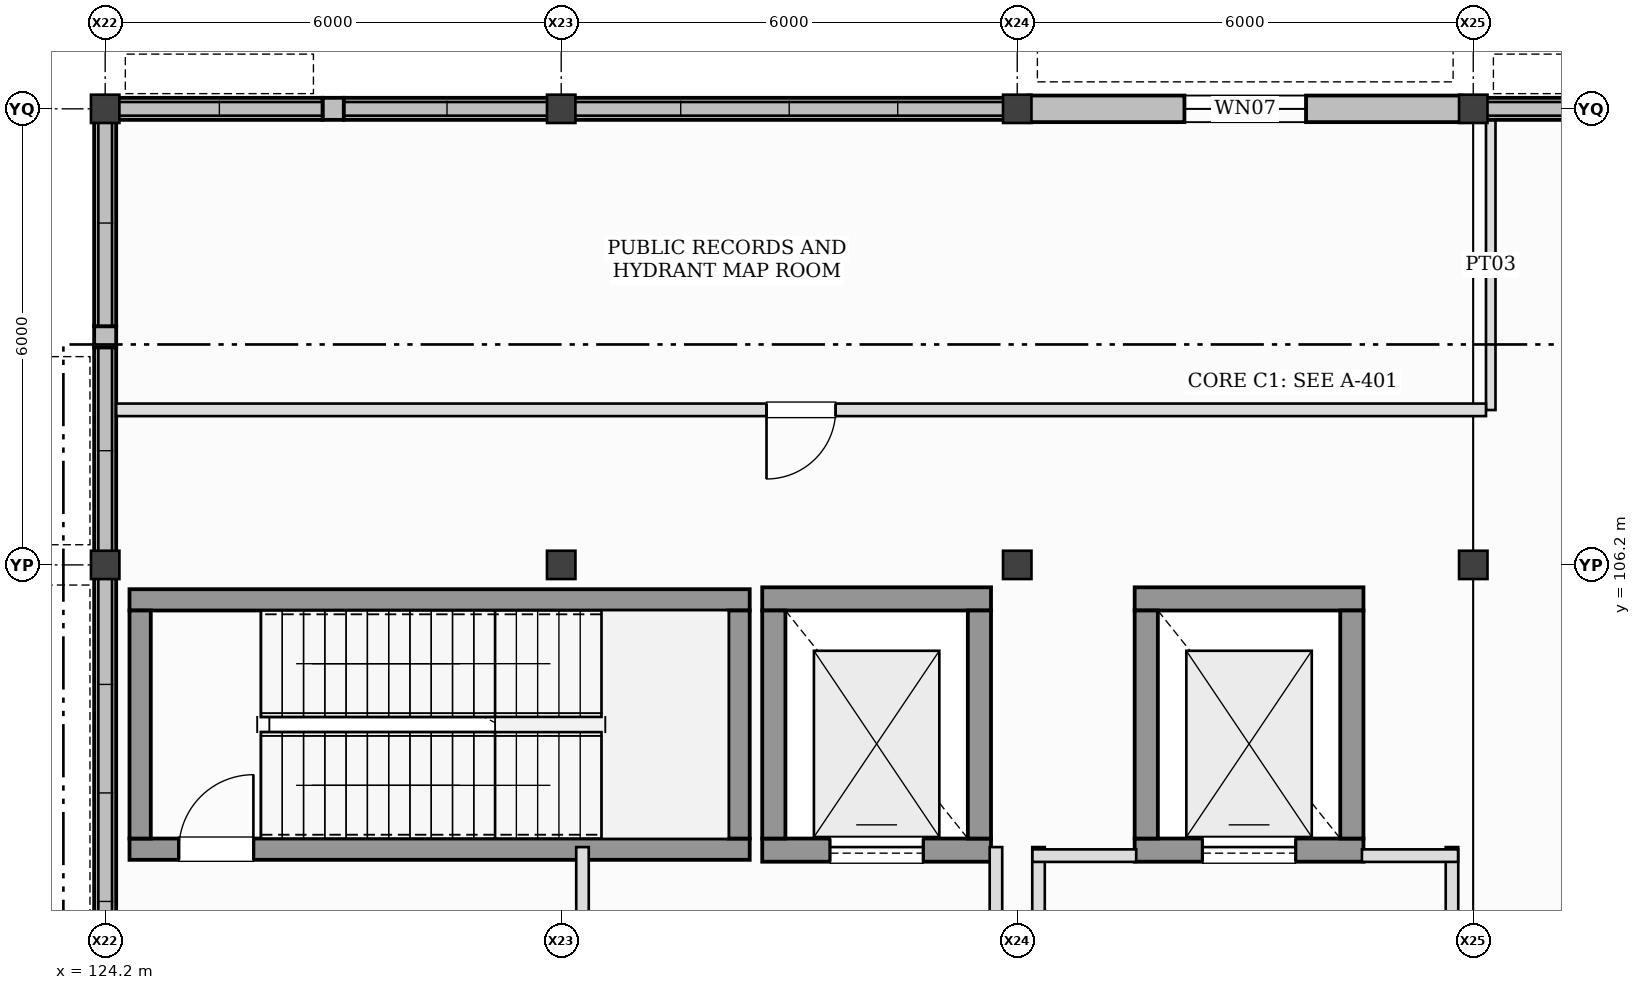
"""IFC4 building model, lengths in metres.
Left out: names, types, materials, properties, quantities, classifications, styles, units other than length and angle.
Written with IfcOpenShell. Run it as: python <this file> out.ifc"""

import sys

from ifc_helpers import new_model, si_unit, direction, frame, frame_2d, origin, origin_2d, place, context, subcontext, project, spatial, rectangle, i_section, extrude, element, fill, save


model = new_model("IFC4")
c1 = context("Model", 3, precision=1e-05, world=origin(), true_north=direction((0.0, 1.0)))
c2 = subcontext(c1, "Body", "Model", "MODEL_VIEW")
j1 = project(units=[si_unit("LENGTHUNIT", "METRE"), si_unit("PLANEANGLEUNIT", "RADIAN")], contexts=[c1])
p1 = place(None, origin())
s1 = spatial("IfcSite", under=j1, at=p1, CompositionType="ELEMENT")
p2 = place(p1, origin())
s2 = spatial("IfcBuilding", under=s1, at=p2, CompositionType="ELEMENT")
p3 = place(p2, origin())
s3 = spatial("IfcBuildingStorey", under=s2, at=p3, CompositionType="ELEMENT", Elevation=0.0)
for number, where, z_axis, x_axis in (
    (1, (124.2, 106.2, 0.0), (0.0, 0.0, 1.0), (1.0, 0.0, 0.0)),
    (2, (124.2, 112.2, 0.0), (0.0, 0.0, 1.0), (1.0, 0.0, 0.0)),
    (3, (130.2, 106.2, 0.0), (0.0, 0.0, 1.0), (1.0, 0.0, 0.0)),
    (4, (130.2, 112.2, 0.0), (0.0, 0.0, 1.0), (1.0, 0.0, 0.0)),
    (5, (136.2, 106.2, 0.0), (0.0, 0.0, 1.0), (1.0, 0.0, 0.0)),
    (6, (136.2, 112.2, 0.0), (0.0, 0.0, 1.0), (1.0, 0.0, 0.0)),
    (7, (142.2, 106.2, 0.0), (0.0, 0.0, 1.0), (1.0, 0.0, 0.0)),
    (8, (142.2, 112.2, 0.0), (0.0, 0.0, 1.0), (1.0, 0.0, 0.0)),
):
    element("IfcColumn", number, at=place(p3, frame(where, z_axis=z_axis, x_axis=x_axis)), inside=s3, PredefinedType="COLUMN", context=c2, shape_type="SweptSolid", body=[
        extrude(i_section(OverallWidth=0.374, OverallDepth=0.372, WebThickness=0.016, FlangeThickness=0.026, at=origin_2d()), origin(), (0.0, 0.0, 1.0), 6.0),
    ])
p4 = place(p3, frame((127.34, 112.2, 0.0), z_axis=(0.0, 0.0, 1.0), x_axis=(-1.0, 0.0, 0.0)))
e9 = element("IfcWall", 9, at=p4, inside=s3, PredefinedType="STANDARD", context=c2, shape_type="SweptSolid", body=[
    extrude(rectangle(XDim=0.28, YDim=0.29, at=frame_2d((0.14, 0.0))), origin(), (0.0, 0.0, 1.0), 5.113),
])
p5 = place(p3, frame((130.055, 112.2, 0.0), z_axis=(0.0, 0.0, 1.0), x_axis=(-1.0, 0.0, 0.0)))
e10 = element("IfcWall", 10, at=p5, inside=s3, PredefinedType="STANDARD", context=c2, shape_type="SweptSolid", body=[
    extrude(rectangle(XDim=2.715, YDim=0.29, at=frame_2d((1.357, 0.0))), origin(), (0.0, 0.0, 1.0), 0.92),
])
p6 = place(p3, frame((127.06, 112.2, 0.0), z_axis=(0.0, 0.0, 1.0), x_axis=(-1.0, 0.0, 0.0)))
e11 = element("IfcWall", 11, at=p6, inside=s3, PredefinedType="STANDARD", context=c2, shape_type="SweptSolid", body=[
    extrude(rectangle(XDim=2.715, YDim=0.29, at=frame_2d((1.357, 0.0))), origin(), (0.0, 0.0, 1.0), 0.32),
])
p7 = place(p3, frame((136.055, 112.2, 0.0), z_axis=(0.0, 0.0, 1.0), x_axis=(-1.0, 0.0, 0.0)))
e12 = element("IfcWall", 12, at=p7, inside=s3, PredefinedType="STANDARD", context=c2, shape_type="SweptSolid", body=[
    extrude(rectangle(XDim=5.71, YDim=0.29, at=frame_2d((2.855, 0.0))), origin(), (0.0, 0.0, 1.0), 0.44),
])
p8 = place(p3, frame((142.055, 112.2, 0.0), z_axis=(0.0, 0.0, 1.0), x_axis=(-1.0, 0.0, 0.0)))
e13 = element("IfcWall", 13, at=p8, inside=s3, PredefinedType="STANDARD", context=c2, shape_type="SweptSolid", body=[
    extrude(rectangle(XDim=5.71, YDim=0.35, at=frame_2d((2.855, 0.0))), origin(), (0.0, 0.0, 1.0), 5.113),
])
p9 = place(p8, frame((2.055, 0.0, 1.0)))
e14 = element("IfcOpeningElement", 14, at=p9, cuts=e13, PredefinedType="OPENING", context=c2, shape_type="SweptSolid", body=[
    extrude(rectangle(XDim=1.6, YDim=1.36, at=frame_2d((0.8, 0.68))), frame((0.0, 0.185, 0.0), z_axis=(0.0, -1.0, 0.0), x_axis=(1.0, 0.0, 0.0)), (0.0, 0.0, 1.0), 0.37),
])
for number, where, z_axis, x_axis in (
    (15, (148.055, 112.2, 0.0), (0.0, 0.0, 1.0), (-1.0, 0.0, 0.0)),
    (16, (124.2, 106.055, 0.0), (0.0, 0.0, 1.0), (0.0, -1.0, 0.0)),
):
    element("IfcWall", number, at=place(p3, frame(where, z_axis=z_axis, x_axis=x_axis)), inside=s3, PredefinedType="STANDARD", context=c2, shape_type="SweptSolid", body=[
        extrude(rectangle(XDim=5.71, YDim=0.29, at=frame_2d((2.855, 0.0))), origin(), (0.0, 0.0, 1.0), 0.56),
    ])
p10 = place(p3, frame((124.2, 109.34, 0.0), z_axis=(0.0, 0.0, 1.0), x_axis=(0.0, -1.0, 0.0)))
e17 = element("IfcWall", 17, at=p10, inside=s3, PredefinedType="STANDARD", context=c2, shape_type="SweptSolid", body=[
    extrude(rectangle(XDim=0.28, YDim=0.29, at=frame_2d((0.14, 0.0))), origin(), (0.0, 0.0, 1.0), 5.044),
])
p11 = place(p3, frame((124.2, 112.055, 0.0), z_axis=(0.0, 0.0, 1.0), x_axis=(0.0, -1.0, 0.0)))
e18 = element("IfcWall", 18, at=p11, inside=s3, PredefinedType="STANDARD", context=c2, shape_type="SweptSolid", body=[
    extrude(rectangle(XDim=2.715, YDim=0.29, at=frame_2d((1.357, 0.0))), origin(), (0.0, 0.0, 1.0), 0.68),
])
p12 = place(p3, frame((124.2, 109.06, 0.0), z_axis=(0.0, 0.0, 1.0), x_axis=(0.0, -1.0, 0.0)))
e19 = element("IfcWall", 19, at=p12, inside=s3, PredefinedType="STANDARD", context=c2, shape_type="SweptSolid", body=[
    extrude(rectangle(XDim=2.715, YDim=0.29, at=frame_2d((1.357, 0.0))), origin(), (0.0, 0.0, 1.0), 0.8),
])
p13 = place(p3, frame((124.52, 102.46, 0.0), z_axis=(0.0, 0.0, 1.0), x_axis=(1.0, 0.0, 0.0)))
e20 = element("IfcWall", 20, at=p13, inside=s3, PredefinedType="SHEAR", context=c2, shape_type="SweptSolid", body=[
    extrude(rectangle(XDim=8.16, YDim=0.28, at=frame_2d((4.08, 0.0))), origin(), (0.0, 0.0, 1.0), 6.0),
])
p14 = place(p13, frame((0.65, 0.0, 0.0)))
e21 = element("IfcOpeningElement", 21, at=p14, cuts=e20, PredefinedType="OPENING", context=c2, shape_type="SweptSolid", body=[
    extrude(rectangle(XDim=0.98, YDim=2.15, at=frame_2d((0.49, 1.075))), frame((0.0, 0.15, 0.0), z_axis=(0.0, -1.0, 0.0), x_axis=(1.0, 0.0, 0.0)), (0.0, 0.0, 1.0), 0.3),
])
p15 = place(p3, frame((132.68, 105.74, 0.0), z_axis=(0.0, 0.0, 1.0), x_axis=(-1.0, 0.0, 0.0)))
e22 = element("IfcWall", 22, at=p15, inside=s3, PredefinedType="SHEAR", context=c2, shape_type="SweptSolid", body=[
    extrude(rectangle(XDim=8.16, YDim=0.28, at=frame_2d((4.08, 0.0))), origin(), (0.0, 0.0, 1.0), 6.0),
])
for number, where, z_axis, x_axis in (
    (23, (124.66, 105.6, 0.0), (0.0, 0.0, 1.0), (0.0, -1.0, 0.0)),
    (24, (132.54, 102.6, 0.0), (0.0, 0.0, 1.0), (0.0, 1.0, 0.0)),
):
    element("IfcWall", number, at=place(p3, frame(where, z_axis=z_axis, x_axis=x_axis)), inside=s3, PredefinedType="SHEAR", context=c2, shape_type="SweptSolid", body=[
        extrude(rectangle(XDim=3.0, YDim=0.28, at=frame_2d((1.5, 0.0))), origin(), (0.0, 0.0, 1.0), 6.0),
    ])
p16 = place(p3, frame((132.845, 102.448, 0.0), z_axis=(0.0, 0.0, 1.0), x_axis=(1.0, 0.0, 0.0)))
e25 = element("IfcWall", 25, at=p16, inside=s3, PredefinedType="SHEAR", context=c2, shape_type="SweptSolid", body=[
    extrude(rectangle(XDim=3.01, YDim=0.305, at=frame_2d((1.505, 0.0))), origin(), (0.0, 0.0, 1.0), 6.0),
])
p17 = place(p16, frame((0.895, 0.0, 0.0)))
e26 = element("IfcOpeningElement", 26, at=p17, cuts=e25, PredefinedType="OPENING", context=c2, shape_type="SweptSolid", body=[
    extrude(rectangle(XDim=1.22, YDim=2.22, at=frame_2d((0.61, 1.11))), frame((0.0, 0.162, 0.0), z_axis=(0.0, -1.0, 0.0), x_axis=(1.0, 0.0, 0.0)), (0.0, 0.0, 1.0), 0.325),
])
p18 = place(p3, frame((135.855, 105.752, 0.0), z_axis=(0.0, 0.0, 1.0), x_axis=(-1.0, 0.0, 0.0)))
e27 = element("IfcWall", 27, at=p18, inside=s3, PredefinedType="SHEAR", context=c2, shape_type="SweptSolid", body=[
    extrude(rectangle(XDim=3.01, YDim=0.305, at=frame_2d((1.505, 0.0))), origin(), (0.0, 0.0, 1.0), 6.0),
])
for number, where, z_axis, x_axis in (
    (28, (132.998, 105.6, 0.0), (0.0, 0.0, 1.0), (0.0, -1.0, 0.0)),
    (29, (135.702, 102.6, 0.0), (0.0, 0.0, 1.0), (0.0, 1.0, 0.0)),
):
    element("IfcWall", number, at=place(p3, frame(where, z_axis=z_axis, x_axis=x_axis)), inside=s3, PredefinedType="SHEAR", context=c2, shape_type="SweptSolid", body=[
        extrude(rectangle(XDim=3.0, YDim=0.305, at=frame_2d((1.5, 0.0))), origin(), (0.0, 0.0, 1.0), 6.0),
    ])
for number, where, z_axis, x_axis in (
    (30, (130.48, 99.5, 0.0), (0.0, 0.0, 1.0), (0.0, 1.0, 0.0)),
    (31, (135.92, 102.488, 0.0), (0.0, 0.0, 1.0), (0.0, -1.0, 0.0)),
):
    element("IfcWall", number, at=place(p3, frame(where, z_axis=z_axis, x_axis=x_axis)), inside=s3, PredefinedType="PARTITIONING", context=c2, shape_type="SweptSolid", body=[
        extrude(rectangle(XDim=2.988, YDim=0.165, at=frame_2d((1.494, 0.0))), origin(), (0.0, 0.0, 1.0), 5.044),
    ])
p19 = place(p3, frame((137.745, 102.448, 0.0), z_axis=(0.0, 0.0, 1.0), x_axis=(1.0, 0.0, 0.0)))
e32 = element("IfcWall", 32, at=p19, inside=s3, PredefinedType="SHEAR", context=c2, shape_type="SweptSolid", body=[
    extrude(rectangle(XDim=3.01, YDim=0.305, at=frame_2d((1.505, 0.0))), origin(), (0.0, 0.0, 1.0), 6.0),
])
p20 = place(p19, frame((0.895, 0.0, 0.0)))
e33 = element("IfcOpeningElement", 33, at=p20, cuts=e32, PredefinedType="OPENING", context=c2, shape_type="SweptSolid", body=[
    extrude(rectangle(XDim=1.22, YDim=2.22, at=frame_2d((0.61, 1.11))), frame((0.0, 0.162, 0.0), z_axis=(0.0, -1.0, 0.0), x_axis=(1.0, 0.0, 0.0)), (0.0, 0.0, 1.0), 0.325),
])
p21 = place(p3, frame((140.755, 105.752, 0.0), z_axis=(0.0, 0.0, 1.0), x_axis=(-1.0, 0.0, 0.0)))
e34 = element("IfcWall", 34, at=p21, inside=s3, PredefinedType="SHEAR", context=c2, shape_type="SweptSolid", body=[
    extrude(rectangle(XDim=3.01, YDim=0.305, at=frame_2d((1.505, 0.0))), origin(), (0.0, 0.0, 1.0), 6.0),
])
for number, where, z_axis, x_axis in (
    (35, (137.897, 105.6, 0.0), (0.0, 0.0, 1.0), (0.0, -1.0, 0.0)),
    (36, (140.603, 102.6, 0.0), (0.0, 0.0, 1.0), (0.0, 1.0, 0.0)),
):
    element("IfcWall", number, at=place(p3, frame(where, z_axis=z_axis, x_axis=x_axis)), inside=s3, PredefinedType="SHEAR", context=c2, shape_type="SweptSolid", body=[
        extrude(rectangle(XDim=3.0, YDim=0.305, at=frame_2d((1.5, 0.0))), origin(), (0.0, 0.0, 1.0), 6.0),
    ])
for number, where, z_axis, x_axis in (
    (37, (136.48, 99.5, 0.0), (0.0, 0.0, 1.0), (0.0, 1.0, 0.0)),
    (38, (141.92, 102.488, 0.0), (0.0, 0.0, 1.0), (0.0, -1.0, 0.0)),
):
    element("IfcWall", number, at=place(p3, frame(where, z_axis=z_axis, x_axis=x_axis)), inside=s3, PredefinedType="PARTITIONING", context=c2, shape_type="SweptSolid", body=[
        extrude(rectangle(XDim=2.988, YDim=0.165, at=frame_2d((1.494, 0.0))), origin(), (0.0, 0.0, 1.0), 5.044),
    ])
p22 = place(p3, frame((136.4, 102.375, 0.0), z_axis=(0.0, 0.0, 1.0), x_axis=(1.0, 0.0, 0.0)))
e39 = element("IfcWall", 39, at=p22, inside=s3, PredefinedType="PARTITIONING", context=c2, shape_type="SweptSolid", body=[
    extrude(rectangle(XDim=1.365, YDim=0.165, at=frame_2d((0.683, 0.0))), origin(), (0.0, 0.0, 1.0), 5.68),
])
p23 = place(p3, frame((140.735, 102.375, 0.0), z_axis=(0.0, 0.0, 1.0), x_axis=(1.0, 0.0, 0.0)))
e40 = element("IfcWall", 40, at=p23, inside=s3, PredefinedType="PARTITIONING", context=c2, shape_type="SweptSolid", body=[
    extrude(rectangle(XDim=1.265, YDim=0.165, at=frame_2d((0.632, 0.0))), origin(), (0.0, 0.0, 1.0), 5.68),
])
p24 = place(p3, frame((142.43, 112.055, 0.0), z_axis=(0.0, 0.0, 1.0), x_axis=(0.0, -1.0, 0.0)))
e41 = element("IfcWall", 41, at=p24, inside=s3, PredefinedType="PARTITIONING", context=c2, shape_type="SweptSolid", body=[
    extrude(rectangle(XDim=3.817, YDim=0.125, at=frame_2d((1.909, 0.0))), origin(), (0.0, 0.0, 1.0), 5.044),
])
p25 = place(p3, frame((142.367, 108.24, 0.0), z_axis=(0.0, 0.0, 1.0), x_axis=(-1.0, 0.0, 0.0)))
e42 = element("IfcWall", 42, at=p25, inside=s3, PredefinedType="PARTITIONING", context=c2, shape_type="SweptSolid", body=[
    extrude(rectangle(XDim=18.022, YDim=0.165, at=frame_2d((9.011, 0.0))), origin(), (0.0, 0.0, 1.0), 5.68),
])
p26 = place(p25, frame((8.556, 0.0, 0.0)))
e43 = element("IfcOpeningElement", 43, at=p26, cuts=e42, PredefinedType="OPENING", context=c2, shape_type="SweptSolid", body=[
    extrude(rectangle(XDim=0.91, YDim=2.1, at=frame_2d((0.455, 1.05))), frame((0.0, 0.093, 0.0), z_axis=(0.0, -1.0, 0.0), x_axis=(1.0, 0.0, 0.0)), (0.0, 0.0, 1.0), 0.185),
])
p27 = place(p9, origin())
e44 = element("IfcWindow", 44, at=p27, inside=s3, PartitioningType="SINGLE_PANEL", PredefinedType="WINDOW", context=c2, shape_type="SweptSolid", body=[
    extrude(rectangle(XDim=1.6, YDim=1.36, at=frame_2d((0.8, 0.68))), frame((0.0, 0.03, 0.0), z_axis=(0.0, -1.0, 0.0), x_axis=(1.0, 0.0, 0.0)), (0.0, 0.0, 1.0), 0.06),
])
fill(e14, e44)
p28 = place(p14, origin())
e45 = element("IfcDoor", 45, at=p28, inside=s3, OperationType="SINGLE_SWING_RIGHT", PredefinedType="DOOR", context=c2, shape_type="SweptSolid", body=[
    extrude(rectangle(XDim=0.98, YDim=2.15, at=frame_2d((0.49, 1.075))), frame((0.0, 0.025, 0.0), z_axis=(0.0, -1.0, 0.0), x_axis=(1.0, 0.0, 0.0)), (0.0, 0.0, 1.0), 0.05),
])
fill(e21, e45)
p29 = place(p17, origin())
e46 = element("IfcDoor", 46, at=p29, inside=s3, OperationType="SLIDING_TO_LEFT", PredefinedType="DOOR", context=c2, shape_type="SweptSolid", body=[
    extrude(rectangle(XDim=1.22, YDim=2.22, at=frame_2d((0.61, 1.11))), frame((0.0, 0.025, 0.0), z_axis=(0.0, -1.0, 0.0), x_axis=(1.0, 0.0, 0.0)), (0.0, 0.0, 1.0), 0.05),
])
fill(e26, e46)
p30 = place(p20, origin())
e47 = element("IfcDoor", 47, at=p30, inside=s3, OperationType="SLIDING_TO_LEFT", PredefinedType="DOOR", context=c2, shape_type="SweptSolid", body=[
    extrude(rectangle(XDim=1.22, YDim=2.22, at=frame_2d((0.61, 1.11))), frame((0.0, 0.025, 0.0), z_axis=(0.0, -1.0, 0.0), x_axis=(1.0, 0.0, 0.0)), (0.0, 0.0, 1.0), 0.05),
])
fill(e33, e47)
p31 = place(p26, frame((0.91, 0.0, 0.0), z_axis=(0.0, 0.0, 1.0), x_axis=(-1.0, 0.0, 0.0)))
e48 = element("IfcDoor", 48, at=p31, inside=s3, OperationType="SINGLE_SWING_RIGHT", PredefinedType="DOOR", context=c2, shape_type="SweptSolid", body=[
    extrude(rectangle(XDim=0.91, YDim=2.1, at=frame_2d((0.455, 1.05))), frame((0.0, 0.025, 0.0), z_axis=(0.0, -1.0, 0.0), x_axis=(1.0, 0.0, 0.0)), (0.0, 0.0, 1.0), 0.05),
])
fill(e43, e48)
save(model, sys.argv[1])
